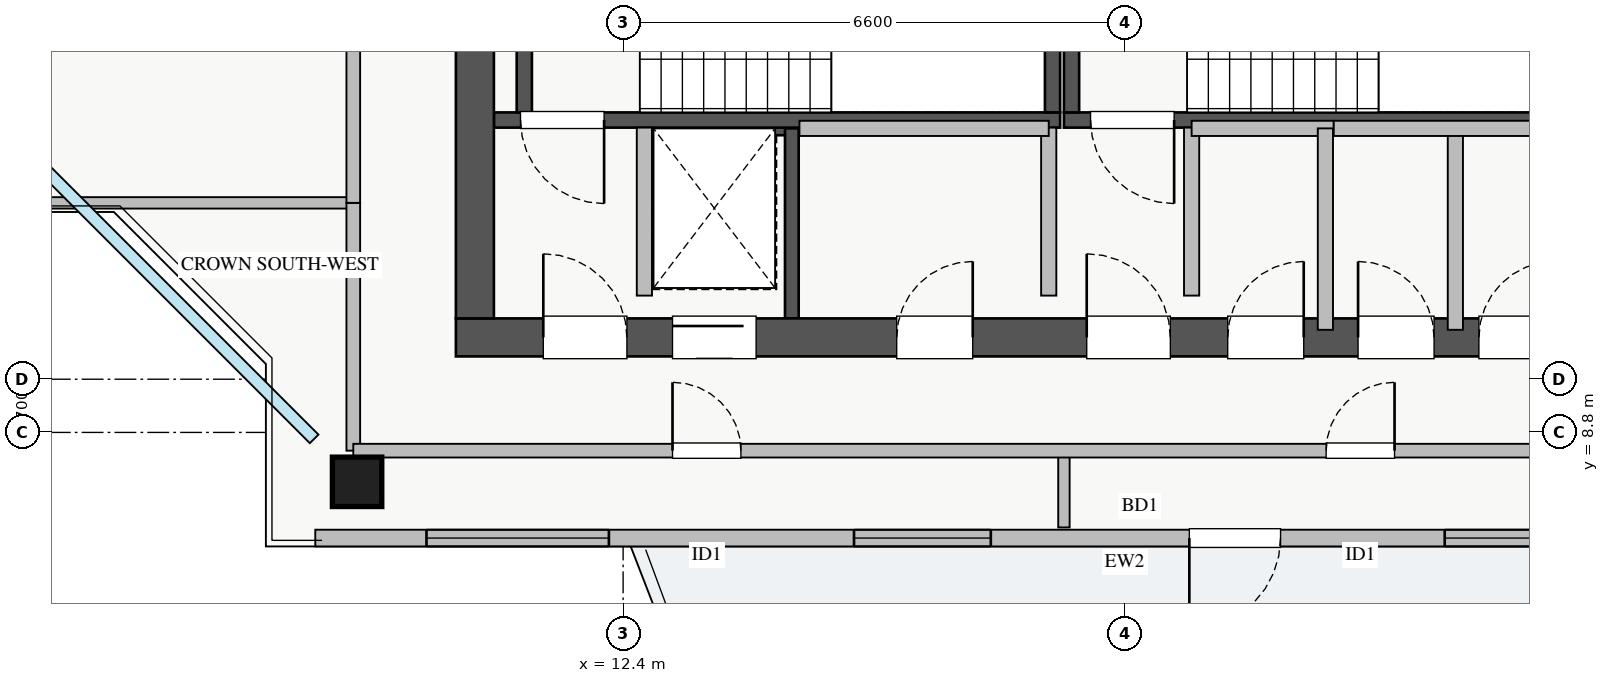
"""IFC4 building model, lengths in metres.
Left out: names, types, materials, properties, quantities, classifications, styles, units other than length and angle.
Written with IfcOpenShell. Run it as: python <this file> out.ifc"""

import sys

from ifc_helpers import new_model, si_unit, direction, frame, frame_2d, origin, origin_2d, place, context, subcontext, project, spatial, rectangle, extrude, source, transform, mapped, element, fill, save


model = new_model("IFC4")
c1 = context("Model", 3, precision=1e-05, world=origin(), true_north=direction((0.0, 1.0)))
c2 = subcontext(c1, "Body", "Model", "MODEL_VIEW")
j1 = project(units=[si_unit("LENGTHUNIT", "METRE"), si_unit("PLANEANGLEUNIT", "RADIAN")], contexts=[c1])
p1 = place(None, origin())
s1 = spatial("IfcSite", under=j1, at=p1, CompositionType="ELEMENT")
p2 = place(p1, origin())
s2 = spatial("IfcBuilding", under=s1, at=p2, CompositionType="ELEMENT")
p3 = place(p2, frame((0.0, 0.0, 253.5)))
s3 = spatial("IfcBuildingStorey", under=s2, at=p3, CompositionType="ELEMENT", Elevation=253.5)
p4 = place(p3, frame((12.68, 12.8, 0.0), z_axis=(0.0, 0.0, 1.0), x_axis=(1.0, 0.0, 0.0)))
e1 = element("IfcWall", 1, at=p4, inside=s3, PredefinedType="SHEAR", context=c2, shape_type="SweptSolid", body=[
    extrude(rectangle(XDim=1.94, YDim=0.18, at=frame_2d((0.97, 0.0))), origin(), (0.0, 0.0, 1.0), 3.07),
])
p5 = place(p3, frame((14.62, 10.3, 0.0), z_axis=(0.0, 0.0, 1.0), x_axis=(0.0, 1.0, 0.0)))
e2 = element("IfcWall", 2, at=p5, inside=s3, PredefinedType="SHEAR", context=c2, shape_type="SweptSolid", body=[
    extrude(rectangle(XDim=2.5, YDim=0.18, at=frame_2d((1.25, 0.0))), origin(), (0.0, 0.0, 1.0), 3.07),
])
p6 = place(p3, frame((10.7, 12.91, 0.0), z_axis=(0.0, 0.0, 1.0), x_axis=(1.0, 0.0, 0.0)))
e3 = element("IfcWall", 3, at=p6, inside=s3, PredefinedType="SHEAR", context=c2, shape_type="SweptSolid", body=[
    extrude(rectangle(XDim=7.45, YDim=0.2, at=frame_2d((3.725, 0.0))), origin(), (0.0, 0.0, 1.0), 3.25),
])
p7 = place(p6, frame((0.35, 0.0, 0.0)))
e4 = element("IfcOpeningElement", 4, at=p7, cuts=e3, PredefinedType="OPENING", context=c2, shape_type="SweptSolid", body=[
    extrude(rectangle(XDim=1.1, YDim=2.05, at=frame_2d((0.55, 1.025))), frame((0.0, 0.11, 0.0), z_axis=(0.0, -1.0, 0.0), x_axis=(1.0, 0.0, 0.0)), (0.0, 0.0, 1.0), 0.22),
])
for number, where, z_axis, x_axis in (
    (5, (11.1, 13.01, 0.0), (0.0, 0.0, 1.0), (0.0, 1.0, 0.0)),
    (6, (18.05, 13.01, 0.0), (0.0, 0.0, 1.0), (0.0, 1.0, 0.0)),
):
    element("IfcWall", number, at=place(p3, frame(where, z_axis=z_axis, x_axis=x_axis)), inside=s3, PredefinedType="SHEAR", context=c2, shape_type="SweptSolid", body=[
        extrude(rectangle(XDim=2.94, YDim=0.2, at=frame_2d((1.47, 0.0))), origin(), (0.0, 0.0, 1.0), 3.25),
    ])
p8 = place(p3, frame((18.2, 12.91, 0.0), z_axis=(0.0, 0.0, 1.0), x_axis=(1.0, 0.0, 0.0)))
e7 = element("IfcWall", 7, at=p8, inside=s3, PredefinedType="SHEAR", context=c2, shape_type="SweptSolid", body=[
    extrude(rectangle(XDim=7.15, YDim=0.2, at=frame_2d((3.575, 0.0))), origin(), (0.0, 0.0, 1.0), 3.25),
])
p9 = place(p8, frame((0.35, 0.0, 0.0)))
e8 = element("IfcOpeningElement", 8, at=p9, cuts=e7, PredefinedType="OPENING", context=c2, shape_type="SweptSolid", body=[
    extrude(rectangle(XDim=1.1, YDim=2.05, at=frame_2d((0.55, 1.025))), frame((0.0, 0.11, 0.0), z_axis=(0.0, -1.0, 0.0), x_axis=(1.0, 0.0, 0.0)), (0.0, 0.0, 1.0), 0.22),
])
p10 = place(p3, frame((18.3, 13.01, 0.0), z_axis=(0.0, 0.0, 1.0), x_axis=(0.0, 1.0, 0.0)))
e9 = element("IfcWall", 9, at=p10, inside=s3, PredefinedType="SHEAR", context=c2, shape_type="SweptSolid", body=[
    extrude(rectangle(XDim=2.94, YDim=0.2, at=frame_2d((1.47, 0.0))), origin(), (0.0, 0.0, 1.0), 3.25),
])
p11 = place(p3, frame((10.2, 10.05, 0.0), z_axis=(0.0, 0.0, 1.0), x_axis=(1.0, 0.0, 0.0)))
e10 = element("IfcWall", 10, at=p11, inside=s3, PredefinedType="SHEAR", context=c2, shape_type="SweptSolid", body=[
    extrude(rectangle(XDim=17.6, YDim=0.5, at=frame_2d((8.8, 0.0))), origin(), (0.0, 0.0, 1.0), 3.25),
])
p12 = place(p11, frame((1.15, 0.0, 0.0)))
e11 = element("IfcOpeningElement", 11, at=p12, cuts=e10, PredefinedType="OPENING", context=c2, shape_type="SweptSolid", body=[
    extrude(rectangle(XDim=1.1, YDim=2.05, at=frame_2d((0.55, 1.025))), frame((0.0, 0.26, 0.0), z_axis=(0.0, -1.0, 0.0), x_axis=(1.0, 0.0, 0.0)), (0.0, 0.0, 1.0), 0.52),
])
p13 = place(p11, frame((8.3, 0.0, 0.0)))
e12 = element("IfcOpeningElement", 12, at=p13, cuts=e10, PredefinedType="OPENING", context=c2, shape_type="SweptSolid", body=[
    extrude(rectangle(XDim=1.1, YDim=2.05, at=frame_2d((0.55, 1.025))), frame((0.0, 0.26, 0.0), z_axis=(0.0, -1.0, 0.0), x_axis=(1.0, 0.0, 0.0)), (0.0, 0.0, 1.0), 0.52),
])
p14 = place(p11, frame((2.85, 0.0, 0.0)))
e13 = element("IfcOpeningElement", 13, at=p14, cuts=e10, PredefinedType="OPENING", context=c2, shape_type="SweptSolid", body=[
    extrude(rectangle(XDim=1.1, YDim=2.05, at=frame_2d((0.55, 1.025))), frame((0.0, 0.26, 0.0), z_axis=(0.0, -1.0, 0.0), x_axis=(1.0, 0.0, 0.0)), (0.0, 0.0, 1.0), 0.52),
])
p15 = place(p11, frame((5.8, 0.0, 0.0)))
e14 = element("IfcOpeningElement", 14, at=p15, cuts=e10, PredefinedType="OPENING", context=c2, shape_type="SweptSolid", body=[
    extrude(rectangle(XDim=1.0, YDim=2.05, at=frame_2d((0.5, 1.025))), frame((0.0, 0.26, 0.0), z_axis=(0.0, -1.0, 0.0), x_axis=(1.0, 0.0, 0.0)), (0.0, 0.0, 1.0), 0.52),
])
p16 = place(p11, frame((14.74, 0.0, 0.0)))
e15 = element("IfcOpeningElement", 15, at=p16, cuts=e10, PredefinedType="OPENING", context=c2, shape_type="SweptSolid", body=[
    extrude(rectangle(XDim=1.0, YDim=2.05, at=frame_2d((0.5, 1.025))), frame((0.0, 0.26, 0.0), z_axis=(0.0, -1.0, 0.0), x_axis=(1.0, 0.0, 0.0)), (0.0, 0.0, 1.0), 0.52),
])
p17 = place(p11, frame((10.155, 0.0, 0.0)))
e16 = element("IfcOpeningElement", 16, at=p17, cuts=e10, PredefinedType="OPENING", context=c2, shape_type="SweptSolid", body=[
    extrude(rectangle(XDim=1.0, YDim=2.05, at=frame_2d((0.5, 1.025))), frame((0.0, 0.26, 0.0), z_axis=(0.0, -1.0, 0.0), x_axis=(1.0, 0.0, 0.0)), (0.0, 0.0, 1.0), 0.52),
])
p18 = place(p11, frame((11.87, 0.0, 0.0)))
e17 = element("IfcOpeningElement", 17, at=p18, cuts=e10, PredefinedType="OPENING", context=c2, shape_type="SweptSolid", body=[
    extrude(rectangle(XDim=1.0, YDim=2.05, at=frame_2d((0.5, 1.025))), frame((0.0, 0.26, 0.0), z_axis=(0.0, -1.0, 0.0), x_axis=(1.0, 0.0, 0.0)), (0.0, 0.0, 1.0), 0.52),
])
p19 = place(p11, frame((13.46, 0.0, 0.0)))
e18 = element("IfcOpeningElement", 18, at=p19, cuts=e10, PredefinedType="OPENING", context=c2, shape_type="SweptSolid", body=[
    extrude(rectangle(XDim=1.0, YDim=2.05, at=frame_2d((0.5, 1.025))), frame((0.0, 0.26, 0.0), z_axis=(0.0, -1.0, 0.0), x_axis=(1.0, 0.0, 0.0)), (0.0, 0.0, 1.0), 0.52),
])
p20 = place(p3, frame((10.45, 10.3, 0.0), z_axis=(0.0, 0.0, 1.0), x_axis=(0.0, 1.0, 0.0)))
e19 = element("IfcWall", 19, at=p20, inside=s3, PredefinedType="SHEAR", context=c2, shape_type="SweptSolid", body=[
    extrude(rectangle(XDim=6.2, YDim=0.5, at=frame_2d((3.1, 0.0))), origin(), (0.0, 0.0, 1.0), 3.25),
])
m1 = source(origin(), c2, "Body", "SweptSolid", [
    extrude(rectangle(XDim=0.65, YDim=0.65, at=origin_2d()), origin(), (0.0, 0.0, 1.0), 3.25),
])
p21 = place(p3, frame((8.9, 8.15, 0.0), z_axis=(0.0, 0.0, 1.0), x_axis=(1.0, 0.0, 0.0)))
e20 = element("IfcColumn", 20, at=p21, inside=s3, PredefinedType="COLUMN", context=c2, shape_type="MappedRepresentation", body=[
    mapped(m1, transform((0.0, 0.0, 0.0), x_axis=(1.0, 0.0, 0.0), y_axis=(0.0, 1.0, 0.0), z_axis=(0.0, 0.0, 1.0), scale=1.0)),
])
p22 = place(p3, frame((8.35, 7.41, 0.0), z_axis=(0.0, 0.0, 1.0), x_axis=(1.0, 0.0, 0.0)))
e21 = element("IfcWall", 21, at=p22, inside=s3, PredefinedType="STANDARD", context=c2, shape_type="SweptSolid", body=[
    extrude(rectangle(XDim=21.3, YDim=0.22, at=frame_2d((10.65, 0.0))), origin(), (0.0, 0.0, 1.0), 2.61),
])
p23 = place(p22, frame((11.5, 0.0, 0.0)))
e22 = element("IfcOpeningElement", 22, at=p23, cuts=e21, PredefinedType="OPENING", context=c2, shape_type="SweptSolid", body=[
    extrude(rectangle(XDim=1.2, YDim=2.1, at=frame_2d((0.6, 1.05))), frame((0.0, 0.12, 0.0), z_axis=(0.0, -1.0, 0.0), x_axis=(1.0, 0.0, 0.0)), (0.0, 0.0, 1.0), 0.24),
])
p24 = place(p22, frame((1.463, 0.0, 0.9)))
e23 = element("IfcOpeningElement", 23, at=p24, cuts=e21, PredefinedType="OPENING", context=c2, shape_type="SweptSolid", body=[
    extrude(rectangle(XDim=2.4, YDim=1.48, at=frame_2d((1.2, 0.74))), frame((0.0, 0.12, 0.0), z_axis=(0.0, -1.0, 0.0), x_axis=(1.0, 0.0, 0.0)), (0.0, 0.0, 1.0), 0.24),
])
p25 = place(p22, frame((7.088, 0.0, 0.9)))
e24 = element("IfcOpeningElement", 24, at=p25, cuts=e21, PredefinedType="OPENING", context=c2, shape_type="SweptSolid", body=[
    extrude(rectangle(XDim=1.8, YDim=1.45, at=frame_2d((0.9, 0.725))), frame((0.0, 0.12, 0.0), z_axis=(0.0, -1.0, 0.0), x_axis=(1.0, 0.0, 0.0)), (0.0, 0.0, 1.0), 0.24),
])
p26 = place(p22, frame((19.775, 0.0, 0.9)))
e25 = element("IfcOpeningElement", 25, at=p26, cuts=e21, PredefinedType="OPENING", context=c2, shape_type="SweptSolid", body=[
    extrude(rectangle(XDim=1.2, YDim=1.4, at=frame_2d((0.6, 0.7))), frame((0.0, 0.12, 0.0), z_axis=(0.0, -1.0, 0.0), x_axis=(1.0, 0.0, 0.0)), (0.0, 0.0, 1.0), 0.24),
])
p27 = place(p22, frame((14.86, 0.0, 0.9)))
e26 = element("IfcOpeningElement", 26, at=p27, cuts=e21, PredefinedType="OPENING", context=c2, shape_type="SweptSolid", body=[
    extrude(rectangle(XDim=2.4, YDim=1.5, at=frame_2d((1.2, 0.75))), frame((0.0, 0.12, 0.0), z_axis=(0.0, -1.0, 0.0), x_axis=(1.0, 0.0, 0.0)), (0.0, 0.0, 1.0), 0.24),
])
for number, where, z_axis, x_axis in (
    (27, (12.68, 10.6, 0.0), (0.0, 0.0, 1.0), (0.0, 1.0, 0.0)),
    (28, (18.0, 10.6, 0.0), (0.0, 0.0, 1.0), (0.0, 1.0, 0.0)),
    (29, (19.88, 10.6, 0.0), (0.0, 0.0, 1.0), (0.0, 1.0, 0.0)),
):
    element("IfcWall", number, at=place(p3, frame(where, z_axis=z_axis, x_axis=x_axis)), inside=s3, PredefinedType="PARTITIONING", context=c2, shape_type="SweptSolid", body=[
        extrude(rectangle(XDim=2.21, YDim=0.2, at=frame_2d((1.105, 0.0))), origin(), (0.0, 0.0, 1.0), 3.07),
    ])
p28 = place(p3, frame((14.72, 12.8, 0.0), z_axis=(0.0, 0.0, 1.0), x_axis=(1.0, 0.0, 0.0)))
e30 = element("IfcWall", 30, at=p28, inside=s3, PredefinedType="PARTITIONING", context=c2, shape_type="SweptSolid", body=[
    extrude(rectangle(XDim=3.28, YDim=0.2, at=frame_2d((1.64, 0.0))), origin(), (0.0, 0.0, 1.0), 3.07),
])
p29 = place(p3, frame((19.88, 12.8, 0.0), z_axis=(0.0, 0.0, 1.0), x_axis=(1.0, 0.0, 0.0)))
e31 = element("IfcWall", 31, at=p29, inside=s3, PredefinedType="PARTITIONING", context=c2, shape_type="SweptSolid", body=[
    extrude(rectangle(XDim=1.87, YDim=0.2, at=frame_2d((0.935, 0.0))), origin(), (0.0, 0.0, 1.0), 3.07),
])
for number, where, z_axis, x_axis in (
    (32, (21.64, 10.15, 0.0), (0.0, 0.0, 1.0), (0.0, 1.0, 0.0)),
    (33, (23.35, 10.15, 0.0), (0.0, 0.0, 1.0), (0.0, 1.0, 0.0)),
):
    element("IfcWall", number, at=place(p3, frame(where, z_axis=z_axis, x_axis=x_axis)), inside=s3, PredefinedType="PARTITIONING", context=c2, shape_type="SweptSolid", body=[
        extrude(rectangle(XDim=2.65, YDim=0.2, at=frame_2d((1.325, 0.0))), origin(), (0.0, 0.0, 1.0), 3.07),
    ])
p30 = place(p3, frame((21.75, 12.8, 0.0), z_axis=(0.0, 0.0, 1.0), x_axis=(1.0, 0.0, 0.0)))
e34 = element("IfcWall", 34, at=p30, inside=s3, PredefinedType="PARTITIONING", context=c2, shape_type="SweptSolid", body=[
    extrude(rectangle(XDim=5.17, YDim=0.2, at=frame_2d((2.585, 0.0))), origin(), (0.0, 0.0, 1.0), 3.07),
])
p31 = place(p3, frame((3.55, 11.82, 0.0), z_axis=(0.0, 0.0, 1.0), x_axis=(1.0, 0.0, 0.0)))
e35 = element("IfcWall", 35, at=p31, inside=s3, PredefinedType="PARTITIONING", context=c2, shape_type="SweptSolid", body=[
    extrude(rectangle(XDim=5.3, YDim=0.15, at=frame_2d((2.65, 0.0))), origin(), (0.0, 0.0, 1.0), 3.07),
])
p32 = place(p3, frame((8.85, 8.56, 0.0), z_axis=(0.0, 0.0, 1.0), x_axis=(0.0, 1.0, 0.0)))
e36 = element("IfcWall", 36, at=p32, inside=s3, PredefinedType="PARTITIONING", context=c2, shape_type="SweptSolid", body=[
    extrude(rectangle(XDim=3.26, YDim=0.18, at=frame_2d((1.63, 0.0))), origin(), (0.0, 0.0, 1.0), 2.569),
])
p33 = place(p3, frame((18.2, 7.55, 0.0), z_axis=(0.0, 0.0, 1.0), x_axis=(0.0, 1.0, 0.0)))
e37 = element("IfcWall", 37, at=p33, inside=s3, PredefinedType="PARTITIONING", context=c2, shape_type="SweptSolid", body=[
    extrude(rectangle(XDim=1.01, YDim=0.15, at=frame_2d((0.505, 0.0))), origin(), (0.0, 0.0, 1.0), 3.07),
])
p34 = place(p3, frame((8.85, 8.56, 0.0), z_axis=(0.0, 0.0, 1.0), x_axis=(1.0, 0.0, 0.0)))
e38 = element("IfcWall", 38, at=p34, inside=s3, PredefinedType="PARTITIONING", context=c2, shape_type="SweptSolid", body=[
    extrude(rectangle(XDim=18.95, YDim=0.18, at=frame_2d((9.475, 0.0))), origin(), (0.0, 0.0, 1.0), 3.07),
])
p35 = place(p34, frame((4.2, 0.0, 0.0)))
e39 = element("IfcOpeningElement", 39, at=p35, cuts=e38, PredefinedType="OPENING", context=c2, shape_type="SweptSolid", body=[
    extrude(rectangle(XDim=0.9, YDim=2.05, at=frame_2d((0.45, 1.025))), frame((0.0, 0.1, 0.0), z_axis=(0.0, -1.0, 0.0), x_axis=(1.0, 0.0, 0.0)), (0.0, 0.0, 1.0), 0.2),
])
p36 = place(p34, frame((12.8, 0.0, 0.0)))
e40 = element("IfcOpeningElement", 40, at=p36, cuts=e38, PredefinedType="OPENING", context=c2, shape_type="SweptSolid", body=[
    extrude(rectangle(XDim=0.9, YDim=2.05, at=frame_2d((0.45, 1.025))), frame((0.0, 0.1, 0.0), z_axis=(0.0, -1.0, 0.0), x_axis=(1.0, 0.0, 0.0)), (0.0, 0.0, 1.0), 0.2),
])
p37 = place(p3, frame((8.85, 11.82, 0.0), z_axis=(0.0, 0.0, 1.0), x_axis=(0.0, 1.0, 0.0)))
e41 = element("IfcWall", 41, at=p37, inside=s3, PredefinedType="PARTITIONING", context=c2, shape_type="SweptSolid", body=[
    extrude(rectangle(XDim=22.36, YDim=0.18, at=frame_2d((11.18, 0.0))), origin(), (0.0, 0.0, 1.0), 2.569),
])
p38 = place(p37, frame((2.475, 0.0, 0.0)))
e42 = element("IfcOpeningElement", 42, at=p38, cuts=e41, PredefinedType="OPENING", context=c2, shape_type="SweptSolid", body=[
    extrude(rectangle(XDim=1.0, YDim=2.05, at=frame_2d((0.5, 1.025))), frame((0.0, 0.1, 0.0), z_axis=(0.0, -1.0, 0.0), x_axis=(1.0, 0.0, 0.0)), (0.0, 0.0, 1.0), 0.2),
])
p39 = place(p37, frame((13.91, 0.0, 0.0)))
e43 = element("IfcOpeningElement", 43, at=p39, cuts=e41, PredefinedType="OPENING", context=c2, shape_type="SweptSolid", body=[
    extrude(rectangle(XDim=1.0, YDim=2.05, at=frame_2d((0.5, 1.025))), frame((0.0, 0.1, 0.0), z_axis=(0.0, -1.0, 0.0), x_axis=(1.0, 0.0, 0.0)), (0.0, 0.0, 1.0), 0.2),
])
m2 = source(origin(), c2, "Body", "SweptSolid", [
    extrude(rectangle(XDim=1.2, YDim=2.1, at=frame_2d((0.6, 1.05))), frame((0.0, 0.025, 0.0), z_axis=(0.0, -1.0, 0.0), x_axis=(1.0, 0.0, 0.0)), (0.0, 0.0, 1.0), 0.05),
])
p40 = place(p23, frame((1.2, 0.0, 0.0), z_axis=(0.0, 0.0, 1.0), x_axis=(-1.0, 0.0, 0.0)))
e44 = element("IfcDoor", 44, at=p40, inside=s3, OperationType="SINGLE_SWING_LEFT", PredefinedType="DOOR", context=c2, shape_type="MappedRepresentation", body=[
    mapped(m2, transform((0.0, 0.0, 0.0), x_axis=(1.0, 0.0, 0.0), y_axis=(0.0, 1.0, 0.0), z_axis=(0.0, 0.0, 1.0), scale=1.0)),
])
fill(e22, e44)
m3 = source(origin(), c2, "Body", "SweptSolid", [
    extrude(rectangle(XDim=2.4, YDim=1.48, at=frame_2d((1.2, 0.74))), frame((0.0, 0.03, 0.0), z_axis=(0.0, -1.0, 0.0), x_axis=(1.0, 0.0, 0.0)), (0.0, 0.0, 1.0), 0.06),
])
p41 = place(p24, origin())
e45 = element("IfcWindow", 45, at=p41, inside=s3, PartitioningType="TRIPLE_PANEL_VERTICAL", PredefinedType="WINDOW", context=c2, shape_type="MappedRepresentation", body=[
    mapped(m3, transform((0.0, 0.0, 0.0), x_axis=(1.0, 0.0, 0.0), y_axis=(0.0, 1.0, 0.0), z_axis=(0.0, 0.0, 1.0), scale=1.0)),
])
fill(e23, e45)
m4 = source(origin(), c2, "Body", "SweptSolid", [
    extrude(rectangle(XDim=1.8, YDim=1.45, at=frame_2d((0.9, 0.725))), frame((0.0, 0.03, 0.0), z_axis=(0.0, -1.0, 0.0), x_axis=(1.0, 0.0, 0.0)), (0.0, 0.0, 1.0), 0.06),
])
p42 = place(p25, origin())
e46 = element("IfcWindow", 46, at=p42, inside=s3, PartitioningType="DOUBLE_PANEL_VERTICAL", PredefinedType="WINDOW", context=c2, shape_type="MappedRepresentation", body=[
    mapped(m4, transform((0.0, 0.0, 0.0), x_axis=(1.0, 0.0, 0.0), y_axis=(0.0, 1.0, 0.0), z_axis=(0.0, 0.0, 1.0), scale=1.0)),
])
fill(e24, e46)
m5 = source(origin(), c2, "Body", "SweptSolid", [
    extrude(rectangle(XDim=1.1, YDim=2.05, at=frame_2d((0.55, 1.025))), frame((0.0, 0.025, 0.0), z_axis=(0.0, -1.0, 0.0), x_axis=(1.0, 0.0, 0.0)), (0.0, 0.0, 1.0), 0.05),
])
p43 = place(p12, origin())
e47 = element("IfcDoor", 47, at=p43, inside=s3, OperationType="SINGLE_SWING_LEFT", PredefinedType="DOOR", context=c2, shape_type="MappedRepresentation", body=[
    mapped(m5, transform((0.0, 0.0, 0.0), x_axis=(1.0, 0.0, 0.0), y_axis=(0.0, 1.0, 0.0), z_axis=(0.0, 0.0, 1.0), scale=1.0)),
])
fill(e11, e47)
p44 = place(p7, frame((1.1, 0.0, 0.0), z_axis=(0.0, 0.0, 1.0), x_axis=(-1.0, 0.0, 0.0)))
e48 = element("IfcDoor", 48, at=p44, inside=s3, OperationType="SINGLE_SWING_RIGHT", PredefinedType="DOOR", context=c2, shape_type="MappedRepresentation", body=[
    mapped(m5, transform((0.0, 0.0, 0.0), x_axis=(1.0, 0.0, 0.0), y_axis=(0.0, 1.0, 0.0), z_axis=(0.0, 0.0, 1.0), scale=1.0)),
])
fill(e4, e48)
p45 = place(p13, origin())
e49 = element("IfcDoor", 49, at=p45, inside=s3, OperationType="SINGLE_SWING_LEFT", PredefinedType="DOOR", context=c2, shape_type="MappedRepresentation", body=[
    mapped(m5, transform((0.0, 0.0, 0.0), x_axis=(1.0, 0.0, 0.0), y_axis=(0.0, 1.0, 0.0), z_axis=(0.0, 0.0, 1.0), scale=1.0)),
])
fill(e12, e49)
p46 = place(p9, frame((1.1, 0.0, 0.0), z_axis=(0.0, 0.0, 1.0), x_axis=(-1.0, 0.0, 0.0)))
e50 = element("IfcDoor", 50, at=p46, inside=s3, OperationType="SINGLE_SWING_RIGHT", PredefinedType="DOOR", context=c2, shape_type="MappedRepresentation", body=[
    mapped(m5, transform((0.0, 0.0, 0.0), x_axis=(1.0, 0.0, 0.0), y_axis=(0.0, 1.0, 0.0), z_axis=(0.0, 0.0, 1.0), scale=1.0)),
])
fill(e8, e50)
p47 = place(p14, origin())
e51 = element("IfcDoor", 51, at=p47, inside=s3, OperationType="SLIDING_TO_RIGHT", PredefinedType="DOOR", context=c2, shape_type="MappedRepresentation", body=[
    mapped(m5, transform((0.0, 0.0, 0.0), x_axis=(1.0, 0.0, 0.0), y_axis=(0.0, 1.0, 0.0), z_axis=(0.0, 0.0, 1.0), scale=1.0)),
])
fill(e13, e51)
m6 = source(origin(), c2, "Body", "SweptSolid", [
    extrude(rectangle(XDim=1.0, YDim=2.05, at=frame_2d((0.5, 1.025))), frame((0.0, 0.025, 0.0), z_axis=(0.0, -1.0, 0.0), x_axis=(1.0, 0.0, 0.0)), (0.0, 0.0, 1.0), 0.05),
])
p48 = place(p15, origin())
e52 = element("IfcDoor", 52, at=p48, inside=s3, OperationType="SINGLE_SWING_RIGHT", PredefinedType="DOOR", context=c2, shape_type="MappedRepresentation", body=[
    mapped(m6, transform((0.0, 0.0, 0.0), x_axis=(1.0, 0.0, 0.0), y_axis=(0.0, 1.0, 0.0), z_axis=(0.0, 0.0, 1.0), scale=1.0)),
])
fill(e14, e52)
p49 = place(p17, origin())
e53 = element("IfcDoor", 53, at=p49, inside=s3, OperationType="SINGLE_SWING_RIGHT", PredefinedType="DOOR", context=c2, shape_type="MappedRepresentation", body=[
    mapped(m6, transform((0.0, 0.0, 0.0), x_axis=(1.0, 0.0, 0.0), y_axis=(0.0, 1.0, 0.0), z_axis=(0.0, 0.0, 1.0), scale=1.0)),
])
fill(e16, e53)
p50 = place(p18, origin())
e54 = element("IfcDoor", 54, at=p50, inside=s3, OperationType="SINGLE_SWING_LEFT", PredefinedType="DOOR", context=c2, shape_type="MappedRepresentation", body=[
    mapped(m6, transform((0.0, 0.0, 0.0), x_axis=(1.0, 0.0, 0.0), y_axis=(0.0, 1.0, 0.0), z_axis=(0.0, 0.0, 1.0), scale=1.0)),
])
fill(e17, e54)
p51 = place(p19, origin())
e55 = element("IfcDoor", 55, at=p51, inside=s3, OperationType="SINGLE_SWING_RIGHT", PredefinedType="DOOR", context=c2, shape_type="MappedRepresentation", body=[
    mapped(m6, transform((0.0, 0.0, 0.0), x_axis=(1.0, 0.0, 0.0), y_axis=(0.0, 1.0, 0.0), z_axis=(0.0, 0.0, 1.0), scale=1.0)),
])
fill(e18, e55)
m7 = source(origin(), c2, "Body", "SweptSolid", [
    extrude(rectangle(XDim=0.9, YDim=2.05, at=frame_2d((0.45, 1.025))), frame((0.0, 0.025, 0.0), z_axis=(0.0, -1.0, 0.0), x_axis=(1.0, 0.0, 0.0)), (0.0, 0.0, 1.0), 0.05),
])
p52 = place(p35, origin())
e56 = element("IfcDoor", 56, at=p52, inside=s3, OperationType="SINGLE_SWING_LEFT", PredefinedType="DOOR", context=c2, shape_type="MappedRepresentation", body=[
    mapped(m7, transform((0.0, 0.0, 0.0), x_axis=(1.0, 0.0, 0.0), y_axis=(0.0, 1.0, 0.0), z_axis=(0.0, 0.0, 1.0), scale=1.0)),
])
fill(e39, e56)
p53 = place(p36, origin())
e57 = element("IfcDoor", 57, at=p53, inside=s3, OperationType="SINGLE_SWING_RIGHT", PredefinedType="DOOR", context=c2, shape_type="MappedRepresentation", body=[
    mapped(m7, transform((0.0, 0.0, 0.0), x_axis=(1.0, 0.0, 0.0), y_axis=(0.0, 1.0, 0.0), z_axis=(0.0, 0.0, 1.0), scale=1.0)),
])
fill(e40, e57)
m8 = source(origin(), c2, "Body", "SweptSolid", [
    extrude(rectangle(XDim=2.4, YDim=1.5, at=frame_2d((1.2, 0.75))), frame((0.0, 0.03, 0.0), z_axis=(0.0, -1.0, 0.0), x_axis=(1.0, 0.0, 0.0)), (0.0, 0.0, 1.0), 0.06),
])
p54 = place(p27, origin())
e58 = element("IfcWindow", 58, at=p54, inside=s3, PartitioningType="TRIPLE_PANEL_VERTICAL", PredefinedType="WINDOW", context=c2, shape_type="MappedRepresentation", body=[
    mapped(m8, transform((0.0, 0.0, 0.0), x_axis=(1.0, 0.0, 0.0), y_axis=(0.0, 1.0, 0.0), z_axis=(0.0, 0.0, 1.0), scale=1.0)),
])
fill(e26, e58)
save(model, sys.argv[1])
